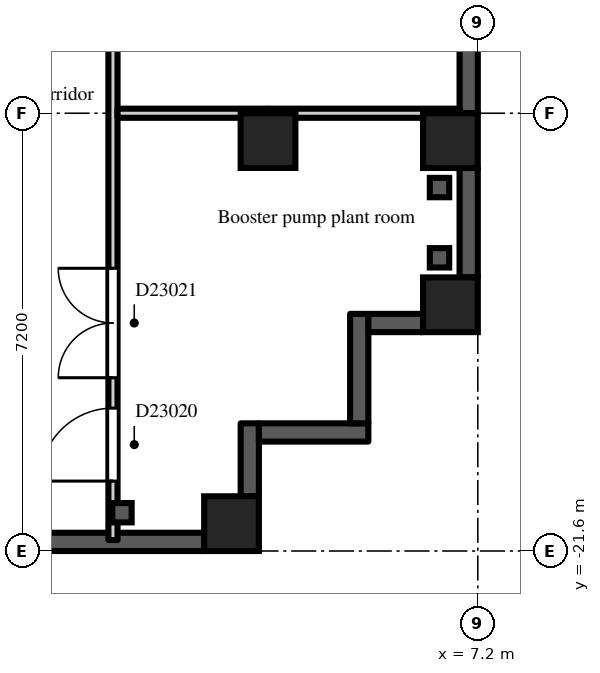
"""IFC4 building model, lengths in metres.
Left out: names, types, materials, properties, quantities, classifications, styles, units other than length and angle.
Written with IfcOpenShell. Run it as: python <this file> out.ifc"""

import sys

from ifc_helpers import new_model, si_unit, direction, frame, frame_2d, origin, origin_2d, place, context, subcontext, project, spatial, rectangle, extrude, element, fill, save


model = new_model("IFC4")
c1 = context("Model", 3, precision=1e-05, world=origin(), true_north=direction((0.0, 1.0)))
c2 = subcontext(c1, "Body", "Model", "MODEL_VIEW")
j1 = project(units=[si_unit("LENGTHUNIT", "METRE"), si_unit("PLANEANGLEUNIT", "RADIAN")], contexts=[c1])
p1 = place(None, origin())
s1 = spatial("IfcSite", under=j1, at=p1, CompositionType="ELEMENT")
p2 = place(p1, origin())
s2 = spatial("IfcBuilding", under=s1, at=p2, CompositionType="ELEMENT")
p3 = place(p2, frame((0.0, 0.0, 162.3)))
s3 = spatial("IfcBuildingStorey", under=s2, at=p3, CompositionType="ELEMENT", Elevation=162.3)
for number, where, z_axis, x_axis in (
    (1, (3.15, -21.15, 0.0), (0.0, 0.0, 1.0), (1.0, 0.0, 0.0)),
    (2, (3.75, -14.85, 0.0), (0.0, 0.0, 1.0), (1.0, 0.0, 0.0)),
    (3, (6.75, -17.55, 0.0), (0.0, 0.0, 1.0), (1.0, 0.0, 0.0)),
    (4, (6.75, -14.85, 0.0), (0.0, 0.0, 1.0), (1.0, 0.0, 0.0)),
):
    element("IfcColumn", number, at=place(p3, frame(where, z_axis=z_axis, x_axis=x_axis)), inside=s3, PredefinedType="COLUMN", context=c2, shape_type="SweptSolid", body=[
        extrude(rectangle(XDim=0.9, YDim=0.9, at=origin_2d()), origin(), (0.0, 0.0, 1.0), 4.2),
    ])
p4 = place(p3, frame((-2.7, -21.45, 0.0), z_axis=(0.0, 0.0, 1.0), x_axis=(1.0, 0.0, 0.0)))
e5 = element("IfcWall", 5, at=p4, inside=s3, PredefinedType="SOLIDWALL", context=c2, shape_type="SweptSolid", body=[
    extrude(rectangle(XDim=5.4, YDim=0.3, at=frame_2d((2.7, 0.0))), origin(), (0.0, 0.0, 1.0), 3.4),
])
p5 = place(p3, frame((3.45, -20.7, 0.0), z_axis=(0.0, 0.0, 1.0), x_axis=(0.0, 1.0, 0.0)))
e6 = element("IfcWall", 6, at=p5, inside=s3, PredefinedType="SOLIDWALL", context=c2, shape_type="SweptSolid", body=[
    extrude(rectangle(XDim=1.2, YDim=0.3, at=frame_2d((0.6, 0.0))), origin(), (0.0, 0.0, 1.0), 3.8),
])
p6 = place(p3, frame((3.6, -19.65, 0.0), z_axis=(0.0, 0.0, 1.0), x_axis=(1.0, 0.0, 0.0)))
e7 = element("IfcWall", 7, at=p6, inside=s3, PredefinedType="SOLIDWALL", context=c2, shape_type="SweptSolid", body=[
    extrude(rectangle(XDim=1.8, YDim=0.3, at=frame_2d((0.9, 0.0))), origin(), (0.0, 0.0, 1.0), 3.8),
])
p7 = place(p3, frame((5.25, -19.5, 0.0), z_axis=(0.0, 0.0, 1.0), x_axis=(0.0, 1.0, 0.0)))
e8 = element("IfcWall", 8, at=p7, inside=s3, PredefinedType="SOLIDWALL", context=c2, shape_type="SweptSolid", body=[
    extrude(rectangle(XDim=1.8, YDim=0.3, at=frame_2d((0.9, 0.0))), origin(), (0.0, 0.0, 1.0), 3.8),
])
p8 = place(p3, frame((5.4, -17.85, 0.0), z_axis=(0.0, 0.0, 1.0), x_axis=(1.0, 0.0, 0.0)))
e9 = element("IfcWall", 9, at=p8, inside=s3, PredefinedType="SOLIDWALL", context=c2, shape_type="SweptSolid", body=[
    extrude(rectangle(XDim=0.9, YDim=0.3, at=frame_2d((0.45, 0.0))), origin(), (0.0, 0.0, 1.0), 3.8),
])
p9 = place(p3, frame((7.05, -17.1, 0.0), z_axis=(0.0, 0.0, 1.0), x_axis=(0.0, 1.0, 0.0)))
e10 = element("IfcWall", 10, at=p9, inside=s3, PredefinedType="SOLIDWALL", context=c2, shape_type="SweptSolid", body=[
    extrude(rectangle(XDim=1.8, YDim=0.3, at=frame_2d((0.9, 0.0))), origin(), (0.0, 0.0, 1.0), 3.4),
])
p10 = place(p3, frame((7.05, -14.4, 0.0), z_axis=(0.0, 0.0, 1.0), x_axis=(0.0, 1.0, 0.0)))
e11 = element("IfcWall", 11, at=p10, inside=s3, PredefinedType="SOLIDWALL", context=c2, shape_type="SweptSolid", body=[
    extrude(rectangle(XDim=7.5, YDim=0.3, at=frame_2d((3.75, 0.0))), origin(), (0.0, 0.0, 1.0), 3.8),
])
p11 = place(p3, frame((1.2, -21.42, 0.0), z_axis=(0.0, 0.0, 1.0), x_axis=(0.0, 1.0, 0.0)))
e12 = element("IfcWall", 12, at=p11, inside=s3, PredefinedType="PARTITIONING", context=c2, shape_type="SweptSolid", body=[
    extrude(rectangle(XDim=20.295, YDim=0.15, at=frame_2d((10.147, 0.0))), origin(), (0.0, 0.0, 1.0), 3.8),
])
p12 = place(p11, frame((15.07, 0.0, 0.0)))
e13 = element("IfcOpeningElement", 13, at=p12, cuts=e12, PredefinedType="OPENING", context=c2, shape_type="SweptSolid", body=[
    extrude(rectangle(XDim=1.2, YDim=2.1, at=frame_2d((0.6, 1.05))), frame((0.0, 0.085, 0.0), z_axis=(0.0, -1.0, 0.0), x_axis=(1.0, 0.0, 0.0)), (0.0, 0.0, 1.0), 0.17),
])
p13 = place(p11, frame((9.72, 0.0, 0.0)))
e14 = element("IfcOpeningElement", 14, at=p13, cuts=e12, PredefinedType="OPENING", context=c2, shape_type="SweptSolid", body=[
    extrude(rectangle(XDim=1.8, YDim=2.1, at=frame_2d((0.9, 1.05))), frame((0.0, 0.085, 0.0), z_axis=(0.0, -1.0, 0.0), x_axis=(1.0, 0.0, 0.0)), (0.0, 0.0, 1.0), 0.17),
])
p14 = place(p11, frame((0.97, 0.0, 0.0)))
e15 = element("IfcOpeningElement", 15, at=p14, cuts=e12, PredefinedType="OPENING", context=c2, shape_type="SweptSolid", body=[
    extrude(rectangle(XDim=1.2, YDim=2.1, at=frame_2d((0.6, 1.05))), frame((0.0, 0.085, 0.0), z_axis=(0.0, -1.0, 0.0), x_axis=(1.0, 0.0, 0.0)), (0.0, 0.0, 1.0), 0.17),
])
p15 = place(p11, frame((2.67, 0.0, 0.0)))
e16 = element("IfcOpeningElement", 16, at=p15, cuts=e12, PredefinedType="OPENING", context=c2, shape_type="SweptSolid", body=[
    extrude(rectangle(XDim=1.8, YDim=2.1, at=frame_2d((0.9, 1.05))), frame((0.0, 0.085, 0.0), z_axis=(0.0, -1.0, 0.0), x_axis=(1.0, 0.0, 0.0)), (0.0, 0.0, 1.0), 0.17),
])
p16 = place(p3, frame((1.275, -14.4, 0.0), z_axis=(0.0, 0.0, 1.0), x_axis=(1.0, 0.0, 0.0)))
e17 = element("IfcWall", 17, at=p16, inside=s3, PredefinedType="PARTITIONING", context=c2, shape_type="SweptSolid", body=[
    extrude(rectangle(XDim=2.475, YDim=0.15, at=frame_2d((1.238, 0.0))), origin(), (0.0, 0.0, 1.0), 3.8),
])
p17 = place(p3, frame((3.75, -14.4, 0.0), z_axis=(0.0, 0.0, 1.0), x_axis=(1.0, 0.0, 0.0)))
e18 = element("IfcWall", 18, at=p17, inside=s3, PredefinedType="PARTITIONING", context=c2, shape_type="SweptSolid", body=[
    extrude(rectangle(XDim=3.15, YDim=0.15, at=frame_2d((1.575, 0.0))), origin(), (0.0, 0.0, 1.0), 3.4),
])
p18 = place(p14, origin())
e19 = element("IfcDoor", 19, at=p18, inside=s3, OperationType="SINGLE_SWING_LEFT", PredefinedType="DOOR", context=c2, shape_type="SweptSolid", body=[
    extrude(rectangle(XDim=1.2, YDim=2.1, at=frame_2d((0.6, 1.05))), frame((0.0, 0.025, 0.0), z_axis=(0.0, -1.0, 0.0), x_axis=(1.0, 0.0, 0.0)), (0.0, 0.0, 1.0), 0.05),
])
fill(e15, e19)
p19 = place(p15, origin())
e20 = element("IfcDoor", 20, at=p19, inside=s3, OperationType="DOUBLE_DOOR_DOUBLE_SWING", PredefinedType="DOOR", context=c2, shape_type="SweptSolid", body=[
    extrude(rectangle(XDim=1.8, YDim=2.1, at=frame_2d((0.9, 1.05))), frame((0.0, 0.025, 0.0), z_axis=(0.0, -1.0, 0.0), x_axis=(1.0, 0.0, 0.0)), (0.0, 0.0, 1.0), 0.05),
])
fill(e16, e20)
save(model, sys.argv[1])
